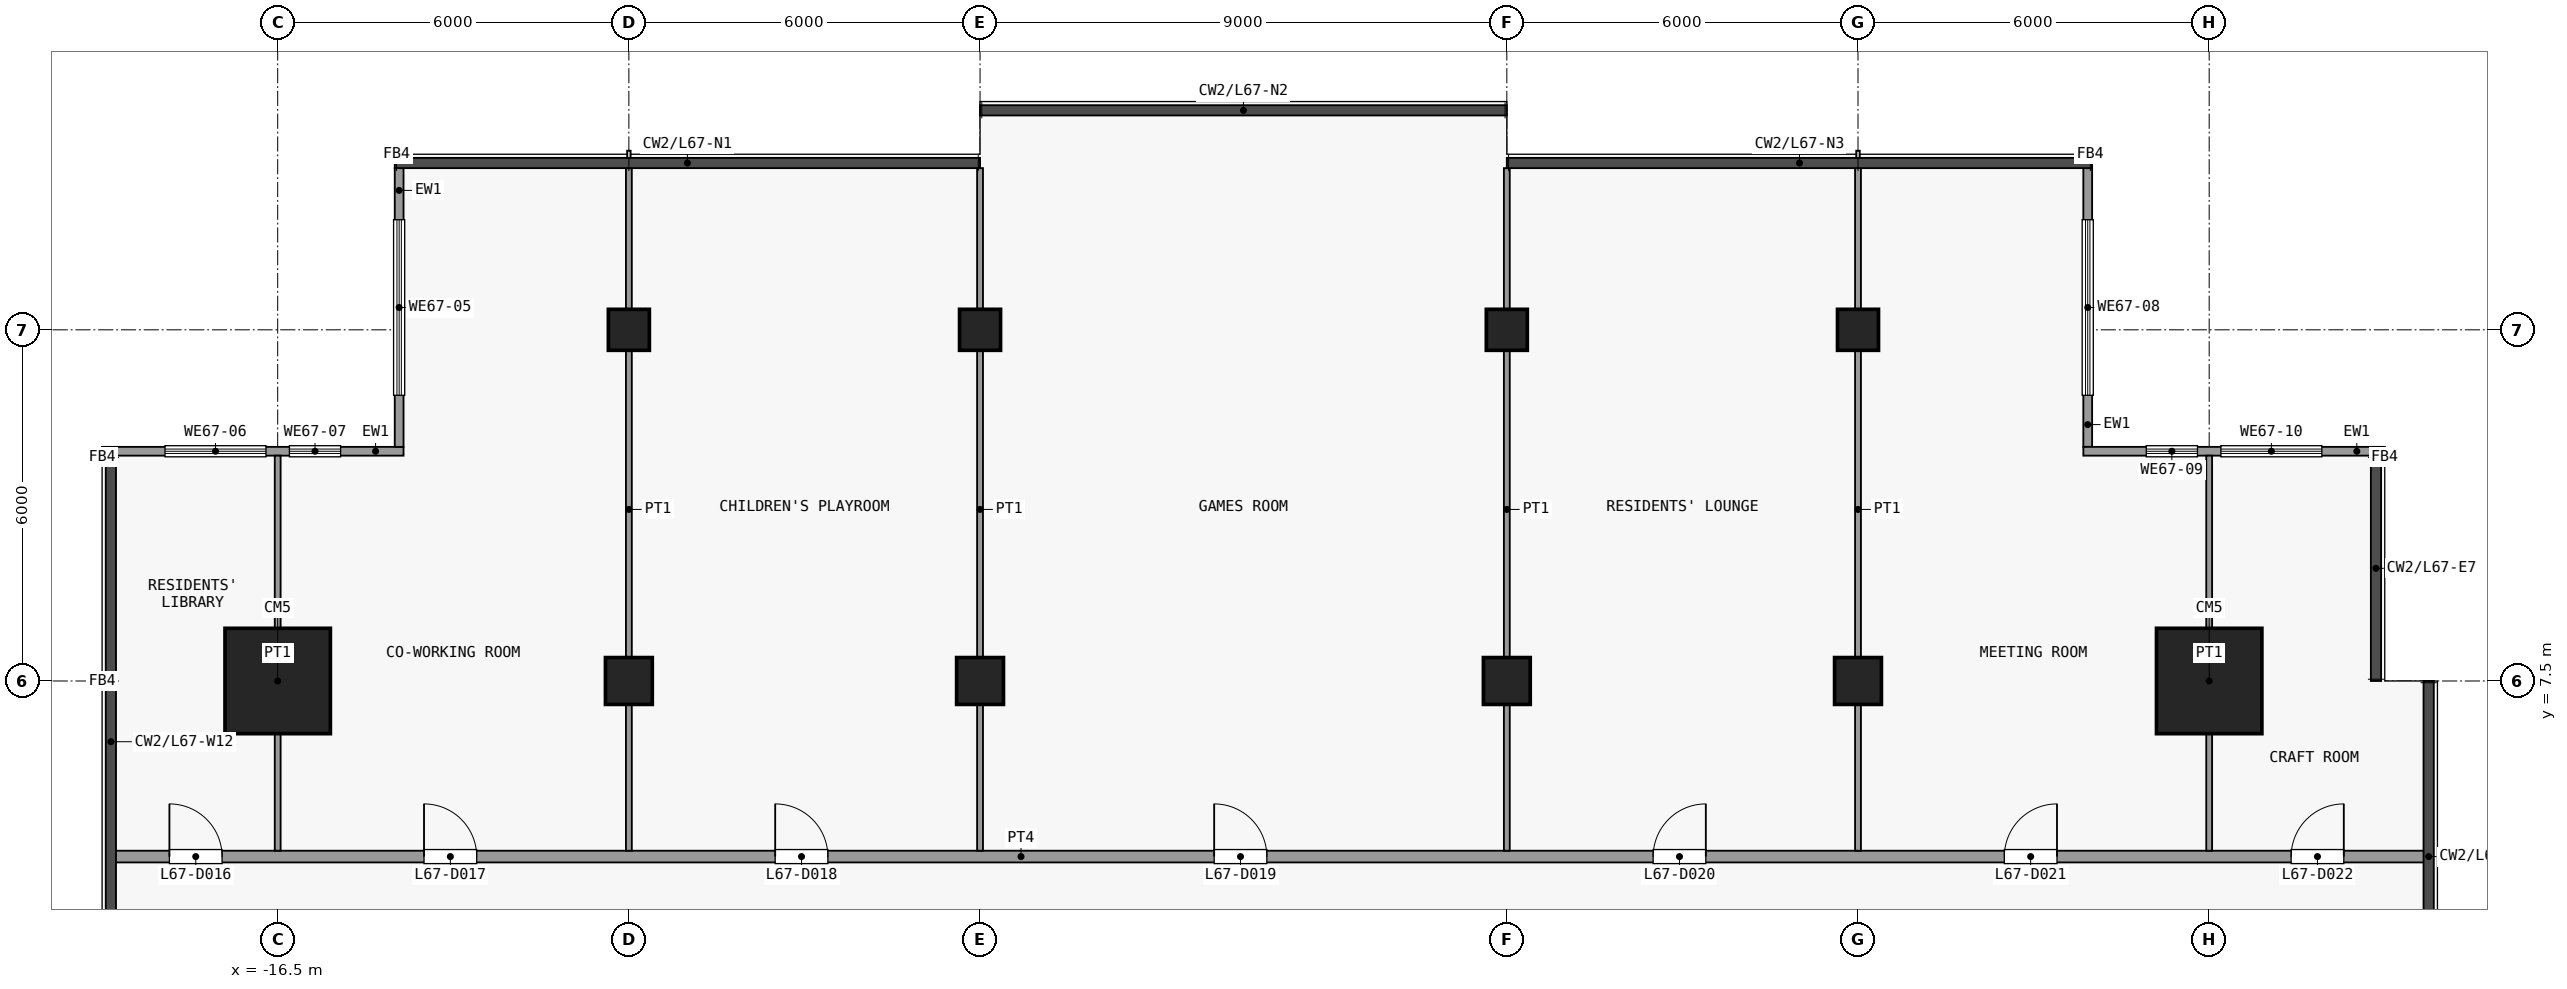
"""IFC4 building model, lengths in metres.
Left out: names, types, materials, properties, quantities, classifications, styles, units other than length and angle.
Written with IfcOpenShell. Run it as: python <this file> out.ifc"""

import sys

from ifc_helpers import new_model, si_unit, direction, frame, frame_2d, origin, origin_2d, place, context, subcontext, project, spatial, rectangle, extrude, element, fill, save


model = new_model("IFC4")
c1 = context("Model", 3, precision=1e-05, world=origin(), true_north=direction((0.0, 1.0)))
c2 = subcontext(c1, "Body", "Model", "MODEL_VIEW")
j1 = project(units=[si_unit("LENGTHUNIT", "METRE"), si_unit("PLANEANGLEUNIT", "RADIAN")], contexts=[c1])
p1 = place(None, origin())
s1 = spatial("IfcSite", under=j1, at=p1, CompositionType="ELEMENT")
p2 = place(p1, origin())
s2 = spatial("IfcBuilding", under=s1, at=p2, CompositionType="ELEMENT")
p3 = place(p2, frame((0.0, 0.0, 266.3)))
s3 = spatial("IfcBuildingStorey", under=s2, at=p3, CompositionType="ELEMENT", Elevation=266.3)
p4 = place(p3, frame((-16.5, 7.5, 0.0), z_axis=(0.0, 0.0, 1.0), x_axis=(1.0, 0.0, 0.0)))
e1 = element("IfcColumn", 1, at=p4, inside=s3, PredefinedType="COLUMN", context=c2, shape_type="SweptSolid", body=[
    extrude(rectangle(XDim=1.8, YDim=1.8, at=origin_2d()), origin(), (0.0, 0.0, 1.0), 3.6),
])
p5 = place(p3, frame((-10.5, 7.5, 0.0), z_axis=(0.0, 0.0, 1.0), x_axis=(1.0, 0.0, 0.0)))
e2 = element("IfcColumn", 2, at=p5, inside=s3, PredefinedType="COLUMN", context=c2, shape_type="SweptSolid", body=[
    extrude(rectangle(XDim=0.8, YDim=0.8, at=origin_2d()), origin(), (0.0, 0.0, 1.0), 3.6),
])
p6 = place(p3, frame((-10.5, 13.5, 0.0), z_axis=(0.0, 0.0, 1.0), x_axis=(1.0, 0.0, 0.0)))
e3 = element("IfcColumn", 3, at=p6, inside=s3, PredefinedType="COLUMN", context=c2, shape_type="SweptSolid", body=[
    extrude(rectangle(XDim=0.7, YDim=0.7, at=origin_2d()), origin(), (0.0, 0.0, 1.0), 3.6),
])
p7 = place(p3, frame((-4.5, 7.5, 0.0), z_axis=(0.0, 0.0, 1.0), x_axis=(1.0, 0.0, 0.0)))
e4 = element("IfcColumn", 4, at=p7, inside=s3, PredefinedType="COLUMN", context=c2, shape_type="SweptSolid", body=[
    extrude(rectangle(XDim=0.8, YDim=0.8, at=origin_2d()), origin(), (0.0, 0.0, 1.0), 3.6),
])
p8 = place(p3, frame((-4.5, 13.5, 0.0), z_axis=(0.0, 0.0, 1.0), x_axis=(1.0, 0.0, 0.0)))
e5 = element("IfcColumn", 5, at=p8, inside=s3, PredefinedType="COLUMN", context=c2, shape_type="SweptSolid", body=[
    extrude(rectangle(XDim=0.7, YDim=0.7, at=origin_2d()), origin(), (0.0, 0.0, 1.0), 3.6),
])
p9 = place(p3, frame((4.5, 7.5, 0.0), z_axis=(0.0, 0.0, 1.0), x_axis=(1.0, 0.0, 0.0)))
e6 = element("IfcColumn", 6, at=p9, inside=s3, PredefinedType="COLUMN", context=c2, shape_type="SweptSolid", body=[
    extrude(rectangle(XDim=0.8, YDim=0.8, at=origin_2d()), origin(), (0.0, 0.0, 1.0), 3.6),
])
p10 = place(p3, frame((4.5, 13.5, 0.0), z_axis=(0.0, 0.0, 1.0), x_axis=(1.0, 0.0, 0.0)))
e7 = element("IfcColumn", 7, at=p10, inside=s3, PredefinedType="COLUMN", context=c2, shape_type="SweptSolid", body=[
    extrude(rectangle(XDim=0.7, YDim=0.7, at=origin_2d()), origin(), (0.0, 0.0, 1.0), 3.6),
])
p11 = place(p3, frame((10.5, 7.5, 0.0), z_axis=(0.0, 0.0, 1.0), x_axis=(1.0, 0.0, 0.0)))
e8 = element("IfcColumn", 8, at=p11, inside=s3, PredefinedType="COLUMN", context=c2, shape_type="SweptSolid", body=[
    extrude(rectangle(XDim=0.8, YDim=0.8, at=origin_2d()), origin(), (0.0, 0.0, 1.0), 3.6),
])
p12 = place(p3, frame((10.5, 13.5, 0.0), z_axis=(0.0, 0.0, 1.0), x_axis=(1.0, 0.0, 0.0)))
e9 = element("IfcColumn", 9, at=p12, inside=s3, PredefinedType="COLUMN", context=c2, shape_type="SweptSolid", body=[
    extrude(rectangle(XDim=0.7, YDim=0.7, at=origin_2d()), origin(), (0.0, 0.0, 1.0), 3.6),
])
p13 = place(p3, frame((16.5, 7.5, 0.0), z_axis=(0.0, 0.0, 1.0), x_axis=(1.0, 0.0, 0.0)))
e10 = element("IfcColumn", 10, at=p13, inside=s3, PredefinedType="COLUMN", context=c2, shape_type="SweptSolid", body=[
    extrude(rectangle(XDim=1.8, YDim=1.8, at=origin_2d()), origin(), (0.0, 0.0, 1.0), 3.6),
])
p14 = place(p3, frame((-14.425, 11.5, 0.0), z_axis=(0.0, 0.0, 1.0), x_axis=(0.0, 1.0, 0.0)))
e11 = element("IfcWall", 11, at=p14, inside=s3, PredefinedType="SOLIDWALL", context=c2, shape_type="SweptSolid", body=[
    extrude(rectangle(XDim=4.762, YDim=0.15, at=frame_2d((2.381, 0.0))), origin(), (0.0, 0.0, 1.0), 3.3),
])
p15 = place(p14, frame((0.881, 0.0, 0.9)))
e12 = element("IfcOpeningElement", 12, at=p15, cuts=e11, PredefinedType="OPENING", context=c2, shape_type="SweptSolid", body=[
    extrude(rectangle(XDim=3.0, YDim=2.4, at=frame_2d((1.5, 1.2))), frame((0.0, 0.085, 0.0), z_axis=(0.0, -1.0, 0.0), x_axis=(1.0, 0.0, 0.0)), (0.0, 0.0, 1.0), 0.17),
])
p16 = place(p3, frame((-19.5, 11.425, 0.0), z_axis=(0.0, 0.0, 1.0), x_axis=(1.0, 0.0, 0.0)))
e13 = element("IfcWall", 13, at=p16, inside=s3, PredefinedType="SOLIDWALL", context=c2, shape_type="SweptSolid", body=[
    extrude(rectangle(XDim=5.15, YDim=0.15, at=frame_2d((2.575, 0.0))), origin(), (0.0, 0.0, 1.0), 3.3),
])
p17 = place(p16, frame((1.075, 0.0, 0.9)))
e14 = element("IfcOpeningElement", 14, at=p17, cuts=e13, PredefinedType="OPENING", context=c2, shape_type="SweptSolid", body=[
    extrude(rectangle(XDim=1.725, YDim=2.4, at=frame_2d((0.863, 1.2))), frame((0.0, 0.085, 0.0), z_axis=(0.0, -1.0, 0.0), x_axis=(1.0, 0.0, 0.0)), (0.0, 0.0, 1.0), 0.17),
])
p18 = place(p16, frame((3.2, 0.0, 0.9)))
e15 = element("IfcOpeningElement", 15, at=p18, cuts=e13, PredefinedType="OPENING", context=c2, shape_type="SweptSolid", body=[
    extrude(rectangle(XDim=0.875, YDim=2.4, at=frame_2d((0.438, 1.2))), frame((0.0, 0.085, 0.0), z_axis=(0.0, -1.0, 0.0), x_axis=(1.0, 0.0, 0.0)), (0.0, 0.0, 1.0), 0.17),
])
p19 = place(p3, frame((14.425, 16.262, 0.0), z_axis=(0.0, 0.0, 1.0), x_axis=(0.0, -1.0, 0.0)))
e16 = element("IfcWall", 16, at=p19, inside=s3, PredefinedType="SOLIDWALL", context=c2, shape_type="SweptSolid", body=[
    extrude(rectangle(XDim=4.762, YDim=0.15, at=frame_2d((2.381, 0.0))), origin(), (0.0, 0.0, 1.0), 3.3),
])
p20 = place(p19, frame((0.881, 0.0, 0.9)))
e17 = element("IfcOpeningElement", 17, at=p20, cuts=e16, PredefinedType="OPENING", context=c2, shape_type="SweptSolid", body=[
    extrude(rectangle(XDim=3.0, YDim=2.4, at=frame_2d((1.5, 1.2))), frame((0.0, 0.085, 0.0), z_axis=(0.0, -1.0, 0.0), x_axis=(1.0, 0.0, 0.0)), (0.0, 0.0, 1.0), 0.17),
])
p21 = place(p3, frame((14.35, 11.425, 0.0), z_axis=(0.0, 0.0, 1.0), x_axis=(1.0, 0.0, 0.0)))
e18 = element("IfcWall", 18, at=p21, inside=s3, PredefinedType="SOLIDWALL", context=c2, shape_type="SweptSolid", body=[
    extrude(rectangle(XDim=5.15, YDim=0.15, at=frame_2d((2.575, 0.0))), origin(), (0.0, 0.0, 1.0), 3.3),
])
p22 = place(p21, frame((1.075, 0.0, 0.9)))
e19 = element("IfcOpeningElement", 19, at=p22, cuts=e18, PredefinedType="OPENING", context=c2, shape_type="SweptSolid", body=[
    extrude(rectangle(XDim=0.875, YDim=2.4, at=frame_2d((0.438, 1.2))), frame((0.0, 0.085, 0.0), z_axis=(0.0, -1.0, 0.0), x_axis=(1.0, 0.0, 0.0)), (0.0, 0.0, 1.0), 0.17),
])
p23 = place(p21, frame((2.35, 0.0, 0.9)))
e20 = element("IfcOpeningElement", 20, at=p23, cuts=e18, PredefinedType="OPENING", context=c2, shape_type="SweptSolid", body=[
    extrude(rectangle(XDim=1.725, YDim=2.4, at=frame_2d((0.863, 1.2))), frame((0.0, 0.085, 0.0), z_axis=(0.0, -1.0, 0.0), x_axis=(1.0, 0.0, 0.0)), (0.0, 0.0, 1.0), 0.17),
])
p24 = place(p3, frame((-19.35, 4.5, 0.0), z_axis=(0.0, 0.0, 1.0), x_axis=(1.0, 0.0, 0.0)))
e21 = element("IfcWall", 21, at=p24, inside=s3, PredefinedType="PARTITIONING", context=c2, shape_type="SweptSolid", body=[
    extrude(rectangle(XDim=39.6, YDim=0.2, at=frame_2d((19.8, 0.0))), origin(), (0.0, 0.0, 1.0), 3.3),
])
p25 = place(p24, frame((1.0, 0.0, 0.0)))
e22 = element("IfcOpeningElement", 22, at=p25, cuts=e21, PredefinedType="OPENING", context=c2, shape_type="SweptSolid", body=[
    extrude(rectangle(XDim=0.9, YDim=2.1, at=frame_2d((0.45, 1.05))), frame((0.0, 0.11, 0.0), z_axis=(0.0, -1.0, 0.0), x_axis=(1.0, 0.0, 0.0)), (0.0, 0.0, 1.0), 0.22),
])
p26 = place(p24, frame((5.35, 0.0, 0.0)))
e23 = element("IfcOpeningElement", 23, at=p26, cuts=e21, PredefinedType="OPENING", context=c2, shape_type="SweptSolid", body=[
    extrude(rectangle(XDim=0.9, YDim=2.1, at=frame_2d((0.45, 1.05))), frame((0.0, 0.11, 0.0), z_axis=(0.0, -1.0, 0.0), x_axis=(1.0, 0.0, 0.0)), (0.0, 0.0, 1.0), 0.22),
])
p27 = place(p24, frame((11.35, 0.0, 0.0)))
e24 = element("IfcOpeningElement", 24, at=p27, cuts=e21, PredefinedType="OPENING", context=c2, shape_type="SweptSolid", body=[
    extrude(rectangle(XDim=0.9, YDim=2.1, at=frame_2d((0.45, 1.05))), frame((0.0, 0.11, 0.0), z_axis=(0.0, -1.0, 0.0), x_axis=(1.0, 0.0, 0.0)), (0.0, 0.0, 1.0), 0.22),
])
p28 = place(p24, frame((18.85, 0.0, 0.0)))
e25 = element("IfcOpeningElement", 25, at=p28, cuts=e21, PredefinedType="OPENING", context=c2, shape_type="SweptSolid", body=[
    extrude(rectangle(XDim=0.9, YDim=2.1, at=frame_2d((0.45, 1.05))), frame((0.0, 0.11, 0.0), z_axis=(0.0, -1.0, 0.0), x_axis=(1.0, 0.0, 0.0)), (0.0, 0.0, 1.0), 0.22),
])
p29 = place(p24, frame((26.35, 0.0, 0.0)))
e26 = element("IfcOpeningElement", 26, at=p29, cuts=e21, PredefinedType="OPENING", context=c2, shape_type="SweptSolid", body=[
    extrude(rectangle(XDim=0.9, YDim=2.1, at=frame_2d((0.45, 1.05))), frame((0.0, 0.11, 0.0), z_axis=(0.0, -1.0, 0.0), x_axis=(1.0, 0.0, 0.0)), (0.0, 0.0, 1.0), 0.22),
])
p30 = place(p24, frame((32.35, 0.0, 0.0)))
e27 = element("IfcOpeningElement", 27, at=p30, cuts=e21, PredefinedType="OPENING", context=c2, shape_type="SweptSolid", body=[
    extrude(rectangle(XDim=0.9, YDim=2.1, at=frame_2d((0.45, 1.05))), frame((0.0, 0.11, 0.0), z_axis=(0.0, -1.0, 0.0), x_axis=(1.0, 0.0, 0.0)), (0.0, 0.0, 1.0), 0.22),
])
p31 = place(p24, frame((37.25, 0.0, 0.0)))
e28 = element("IfcOpeningElement", 28, at=p31, cuts=e21, PredefinedType="OPENING", context=c2, shape_type="SweptSolid", body=[
    extrude(rectangle(XDim=0.9, YDim=2.1, at=frame_2d((0.45, 1.05))), frame((0.0, 0.11, 0.0), z_axis=(0.0, -1.0, 0.0), x_axis=(1.0, 0.0, 0.0)), (0.0, 0.0, 1.0), 0.22),
])
p32 = place(p3, frame((-16.5, 4.6, 0.0), z_axis=(0.0, 0.0, 1.0), x_axis=(0.0, 1.0, 0.0)))
e29 = element("IfcWall", 29, at=p32, inside=s3, PredefinedType="PARTITIONING", context=c2, shape_type="SweptSolid", body=[
    extrude(rectangle(XDim=6.75, YDim=0.1, at=frame_2d((3.375, 0.0))), origin(), (0.0, 0.0, 1.0), 3.3),
])
for number, where, z_axis, x_axis in (
    (30, (-10.5, 4.6, 0.0), (0.0, 0.0, 1.0), (0.0, 1.0, 0.0)),
    (31, (-4.5, 4.6, 0.0), (0.0, 0.0, 1.0), (0.0, 1.0, 0.0)),
    (32, (4.5, 4.6, 0.0), (0.0, 0.0, 1.0), (0.0, 1.0, 0.0)),
    (33, (10.5, 4.6, 0.0), (0.0, 0.0, 1.0), (0.0, 1.0, 0.0)),
):
    element("IfcWall", number, at=place(p3, frame(where, z_axis=z_axis, x_axis=x_axis)), inside=s3, PredefinedType="PARTITIONING", context=c2, shape_type="SweptSolid", body=[
        extrude(rectangle(XDim=11.662, YDim=0.1, at=frame_2d((5.831, 0.0))), origin(), (0.0, 0.0, 1.0), 3.3),
    ])
p33 = place(p3, frame((16.5, 4.6, 0.0), z_axis=(0.0, 0.0, 1.0), x_axis=(0.0, 1.0, 0.0)))
e34 = element("IfcWall", 34, at=p33, inside=s3, PredefinedType="PARTITIONING", context=c2, shape_type="SweptSolid", body=[
    extrude(rectangle(XDim=6.75, YDim=0.1, at=frame_2d((3.375, 0.0))), origin(), (0.0, 0.0, 1.0), 3.3),
])
p34 = place(p15, origin())
e35 = element("IfcWindow", 35, at=p34, inside=s3, PartitioningType="SINGLE_PANEL", PredefinedType="WINDOW", context=c2, shape_type="SweptSolid", body=[
    extrude(rectangle(XDim=3.0, YDim=2.4, at=frame_2d((1.5, 1.2))), frame((0.0, 0.03, 0.0), z_axis=(0.0, -1.0, 0.0), x_axis=(1.0, 0.0, 0.0)), (0.0, 0.0, 1.0), 0.06),
])
fill(e12, e35)
p35 = place(p17, origin())
e36 = element("IfcWindow", 36, at=p35, inside=s3, PartitioningType="SINGLE_PANEL", PredefinedType="WINDOW", context=c2, shape_type="SweptSolid", body=[
    extrude(rectangle(XDim=1.725, YDim=2.4, at=frame_2d((0.863, 1.2))), frame((0.0, 0.03, 0.0), z_axis=(0.0, -1.0, 0.0), x_axis=(1.0, 0.0, 0.0)), (0.0, 0.0, 1.0), 0.06),
])
fill(e14, e36)
p36 = place(p18, origin())
e37 = element("IfcWindow", 37, at=p36, inside=s3, PartitioningType="SINGLE_PANEL", PredefinedType="WINDOW", context=c2, shape_type="SweptSolid", body=[
    extrude(rectangle(XDim=0.875, YDim=2.4, at=frame_2d((0.438, 1.2))), frame((0.0, 0.03, 0.0), z_axis=(0.0, -1.0, 0.0), x_axis=(1.0, 0.0, 0.0)), (0.0, 0.0, 1.0), 0.06),
])
fill(e15, e37)
p37 = place(p20, origin())
e38 = element("IfcWindow", 38, at=p37, inside=s3, PartitioningType="SINGLE_PANEL", PredefinedType="WINDOW", context=c2, shape_type="SweptSolid", body=[
    extrude(rectangle(XDim=3.0, YDim=2.4, at=frame_2d((1.5, 1.2))), frame((0.0, 0.03, 0.0), z_axis=(0.0, -1.0, 0.0), x_axis=(1.0, 0.0, 0.0)), (0.0, 0.0, 1.0), 0.06),
])
fill(e17, e38)
p38 = place(p22, origin())
e39 = element("IfcWindow", 39, at=p38, inside=s3, PartitioningType="SINGLE_PANEL", PredefinedType="WINDOW", context=c2, shape_type="SweptSolid", body=[
    extrude(rectangle(XDim=0.875, YDim=2.4, at=frame_2d((0.438, 1.2))), frame((0.0, 0.03, 0.0), z_axis=(0.0, -1.0, 0.0), x_axis=(1.0, 0.0, 0.0)), (0.0, 0.0, 1.0), 0.06),
])
fill(e19, e39)
p39 = place(p23, origin())
e40 = element("IfcWindow", 40, at=p39, inside=s3, PartitioningType="SINGLE_PANEL", PredefinedType="WINDOW", context=c2, shape_type="SweptSolid", body=[
    extrude(rectangle(XDim=1.725, YDim=2.4, at=frame_2d((0.863, 1.2))), frame((0.0, 0.03, 0.0), z_axis=(0.0, -1.0, 0.0), x_axis=(1.0, 0.0, 0.0)), (0.0, 0.0, 1.0), 0.06),
])
fill(e20, e40)
p40 = place(p25, origin())
e41 = element("IfcDoor", 41, at=p40, inside=s3, OperationType="SINGLE_SWING_RIGHT", PredefinedType="DOOR", context=c2, shape_type="SweptSolid", body=[
    extrude(rectangle(XDim=0.9, YDim=2.1, at=frame_2d((0.45, 1.05))), frame((0.0, 0.025, 0.0), z_axis=(0.0, -1.0, 0.0), x_axis=(1.0, 0.0, 0.0)), (0.0, 0.0, 1.0), 0.05),
])
fill(e22, e41)
p41 = place(p26, origin())
e42 = element("IfcDoor", 42, at=p41, inside=s3, OperationType="SINGLE_SWING_RIGHT", PredefinedType="DOOR", context=c2, shape_type="SweptSolid", body=[
    extrude(rectangle(XDim=0.9, YDim=2.1, at=frame_2d((0.45, 1.05))), frame((0.0, 0.025, 0.0), z_axis=(0.0, -1.0, 0.0), x_axis=(1.0, 0.0, 0.0)), (0.0, 0.0, 1.0), 0.05),
])
fill(e23, e42)
p42 = place(p27, origin())
e43 = element("IfcDoor", 43, at=p42, inside=s3, OperationType="SINGLE_SWING_RIGHT", PredefinedType="DOOR", context=c2, shape_type="SweptSolid", body=[
    extrude(rectangle(XDim=0.9, YDim=2.1, at=frame_2d((0.45, 1.05))), frame((0.0, 0.025, 0.0), z_axis=(0.0, -1.0, 0.0), x_axis=(1.0, 0.0, 0.0)), (0.0, 0.0, 1.0), 0.05),
])
fill(e24, e43)
p43 = place(p28, origin())
e44 = element("IfcDoor", 44, at=p43, inside=s3, OperationType="SINGLE_SWING_RIGHT", PredefinedType="DOOR", context=c2, shape_type="SweptSolid", body=[
    extrude(rectangle(XDim=0.9, YDim=2.1, at=frame_2d((0.45, 1.05))), frame((0.0, 0.025, 0.0), z_axis=(0.0, -1.0, 0.0), x_axis=(1.0, 0.0, 0.0)), (0.0, 0.0, 1.0), 0.05),
])
fill(e25, e44)
p44 = place(p29, origin())
e45 = element("IfcDoor", 45, at=p44, inside=s3, OperationType="SINGLE_SWING_LEFT", PredefinedType="DOOR", context=c2, shape_type="SweptSolid", body=[
    extrude(rectangle(XDim=0.9, YDim=2.1, at=frame_2d((0.45, 1.05))), frame((0.0, 0.025, 0.0), z_axis=(0.0, -1.0, 0.0), x_axis=(1.0, 0.0, 0.0)), (0.0, 0.0, 1.0), 0.05),
])
fill(e26, e45)
p45 = place(p30, origin())
e46 = element("IfcDoor", 46, at=p45, inside=s3, OperationType="SINGLE_SWING_LEFT", PredefinedType="DOOR", context=c2, shape_type="SweptSolid", body=[
    extrude(rectangle(XDim=0.9, YDim=2.1, at=frame_2d((0.45, 1.05))), frame((0.0, 0.025, 0.0), z_axis=(0.0, -1.0, 0.0), x_axis=(1.0, 0.0, 0.0)), (0.0, 0.0, 1.0), 0.05),
])
fill(e27, e46)
p46 = place(p31, origin())
e47 = element("IfcDoor", 47, at=p46, inside=s3, OperationType="SINGLE_SWING_LEFT", PredefinedType="DOOR", context=c2, shape_type="SweptSolid", body=[
    extrude(rectangle(XDim=0.9, YDim=2.1, at=frame_2d((0.45, 1.05))), frame((0.0, 0.025, 0.0), z_axis=(0.0, -1.0, 0.0), x_axis=(1.0, 0.0, 0.0)), (0.0, 0.0, 1.0), 0.05),
])
fill(e28, e47)
save(model, sys.argv[1])
